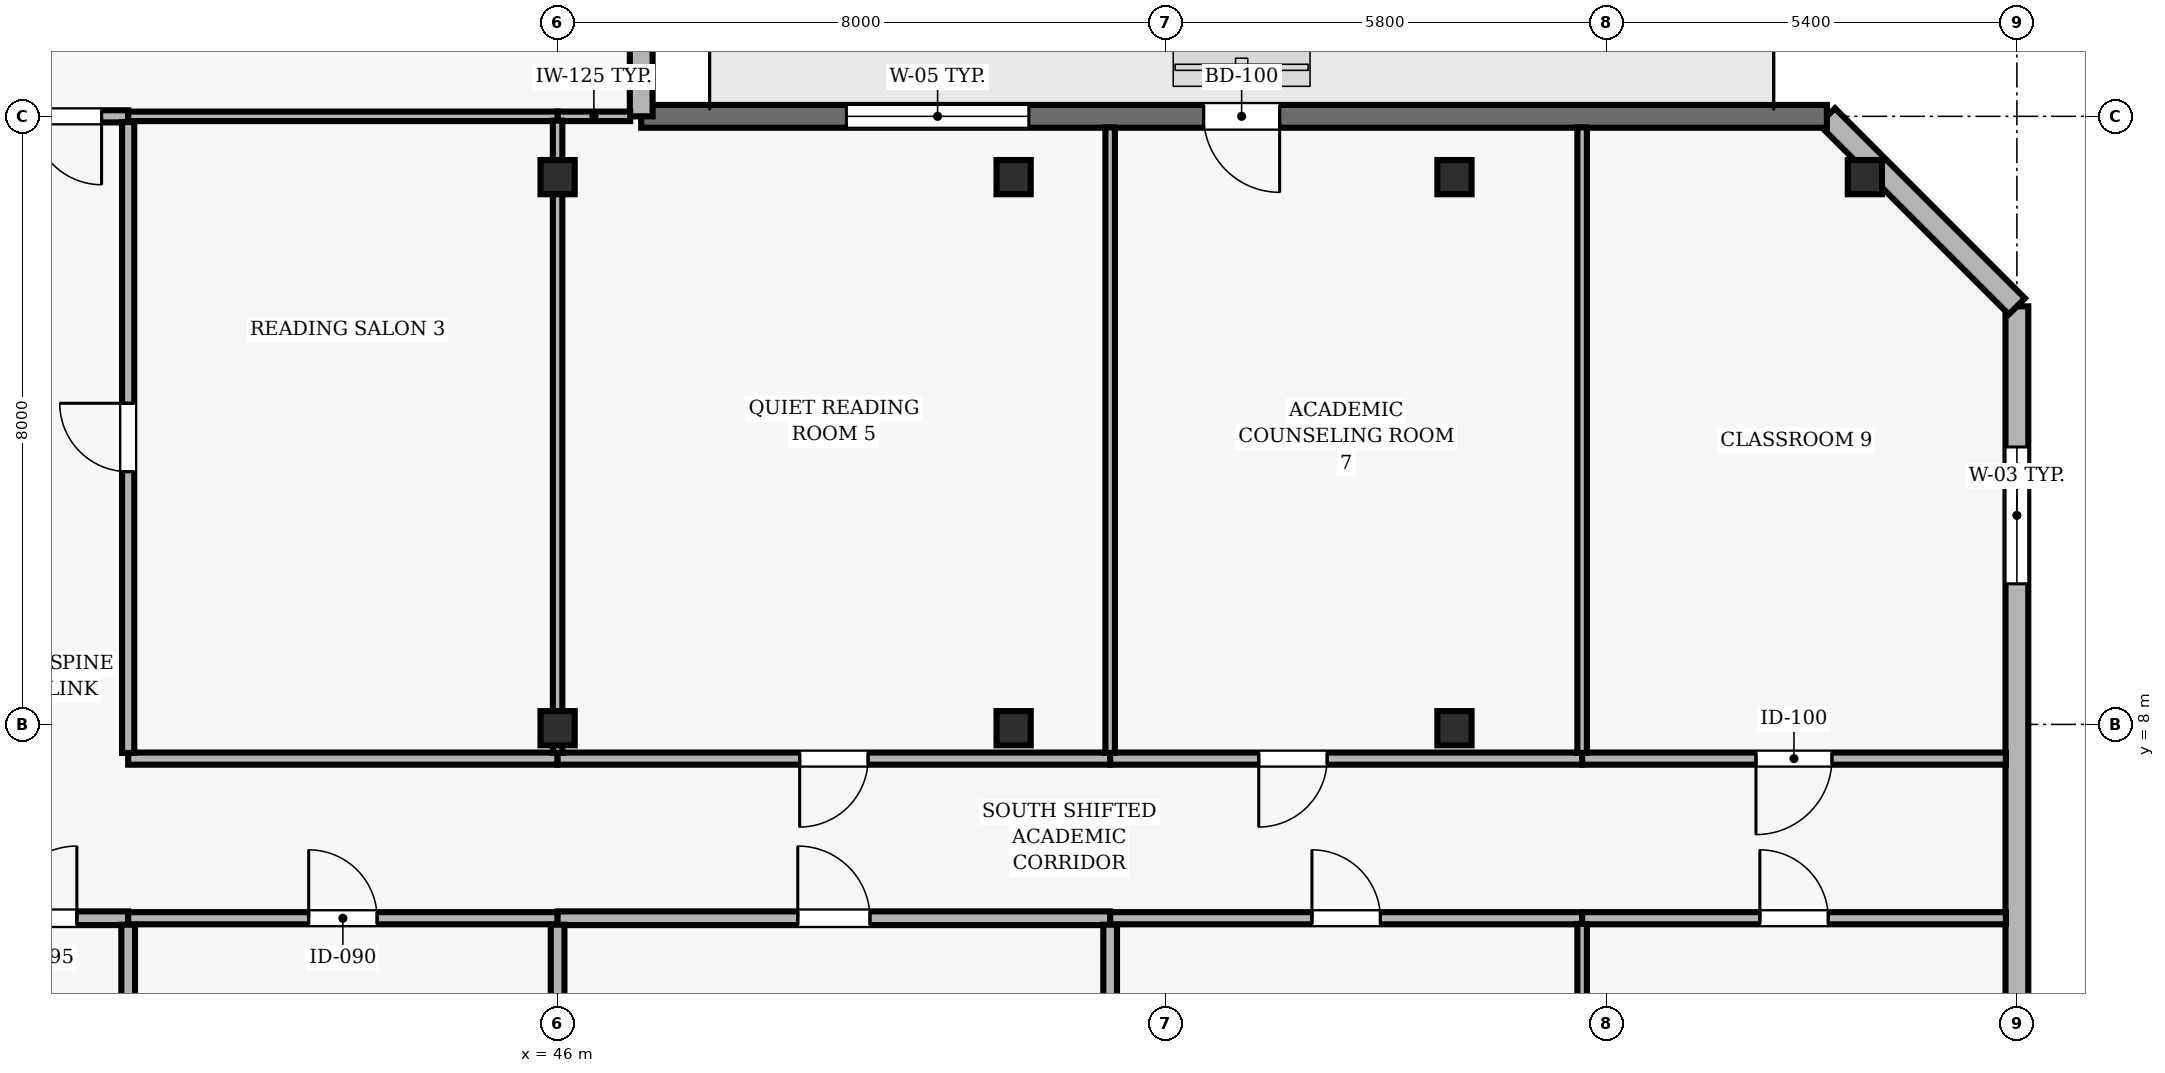
"""IFC4 building model, lengths in metres.
Left out: names, types, materials, properties, quantities, classifications, styles, units other than length and angle.
Written with IfcOpenShell. Run it as: python <this file> out.ifc"""

import sys

from ifc_helpers import new_model, si_unit, direction, frame, frame_2d, origin, origin_2d, place, context, subcontext, project, spatial, rectangle, hollow_rectangle, extrude, element, fill, save


model = new_model("IFC4")
c1 = context("Model", 3, precision=1e-05, world=origin(), true_north=direction((0.0, 1.0)))
c2 = subcontext(c1, "Body", "Model", "MODEL_VIEW")
j1 = project(units=[si_unit("LENGTHUNIT", "METRE"), si_unit("PLANEANGLEUNIT", "RADIAN")], contexts=[c1])
p1 = place(None, origin())
s1 = spatial("IfcSite", under=j1, at=p1, CompositionType="ELEMENT")
p2 = place(p1, origin())
s2 = spatial("IfcBuilding", under=s1, at=p2, CompositionType="ELEMENT")
p3 = place(p2, frame((0.0, 0.0, 199.2)))
s3 = spatial("IfcBuildingStorey", under=s2, at=p3, CompositionType="ELEMENT", Elevation=199.2)
for number, where, z_axis, x_axis in (
    (1, (46.0, 7.95, 0.0), (0.0, 0.0, 1.0), (1.0, 0.0, 0.0)),
    (2, (46.0, 15.2, 0.0), (0.0, 0.0, 1.0), (1.0, 0.0, 0.0)),
    (3, (52.0, 7.95, 0.0), (0.0, 0.0, 1.0), (1.0, 0.0, 0.0)),
    (4, (52.0, 15.2, 0.0), (0.0, 0.0, 1.0), (1.0, 0.0, 0.0)),
    (5, (57.8, 7.95, 0.0), (0.0, 0.0, 1.0), (1.0, 0.0, 0.0)),
    (6, (57.8, 15.2, 0.0), (0.0, 0.0, 1.0), (1.0, 0.0, 0.0)),
    (7, (63.2, 15.2, 0.0), (0.0, 0.0, 1.0), (1.0, 0.0, 0.0)),
):
    element("IfcColumn", number, at=place(p3, frame(where, z_axis=z_axis, x_axis=x_axis)), inside=s3, PredefinedType="COLUMN", context=c2, shape_type="SweptSolid", body=[
        extrude(hollow_rectangle(XDim=0.45, YDim=0.45, WallThickness=0.02, at=origin_2d()), origin(), (0.0, 0.0, 1.0), 3.9),
    ])
p4 = place(p3, frame((65.2, 2.5, 0.0), z_axis=(0.0, 0.0, 1.0), x_axis=(0.0, 1.0, 0.0)))
e8 = element("IfcWall", 8, at=p4, inside=s3, PredefinedType="SOLIDWALL", context=c2, shape_type="SweptSolid", body=[
    extrude(rectangle(XDim=11.0, YDim=0.3, at=frame_2d((5.5, 0.0))), origin(), (0.0, 0.0, 1.0), 3.69),
])
p5 = place(p4, frame((7.35, 0.0, 0.9)))
e9 = element("IfcOpeningElement", 9, at=p5, cuts=e8, PredefinedType="OPENING", context=c2, shape_type="SweptSolid", body=[
    extrude(rectangle(XDim=1.8, YDim=1.6, at=frame_2d((0.9, 0.8))), frame((0.0, 0.16, 0.0), z_axis=(0.0, -1.0, 0.0), x_axis=(1.0, 0.0, 0.0)), (0.0, 0.0, 1.0), 0.32),
])
p6 = place(p3, frame((65.2, 13.5, 0.0), z_axis=(0.0, 0.0, 1.0), x_axis=(-0.707106781187, 0.707106781187, 0.0)))
e10 = element("IfcWall", 10, at=p6, inside=s3, PredefinedType="SOLIDWALL", context=c2, shape_type="SweptSolid", body=[
    extrude(rectangle(XDim=3.536, YDim=0.3, at=frame_2d((1.768, 0.0))), origin(), (0.0, 0.0, 1.0), 3.69),
])
p7 = place(p3, frame((62.7, 16.0, 0.0), z_axis=(0.0, 0.0, 1.0), x_axis=(-1.0, 0.0, 0.0)))
e11 = element("IfcWall", 11, at=p7, inside=s3, PredefinedType="SOLIDWALL", context=c2, shape_type="SweptSolid", body=[
    extrude(rectangle(XDim=15.6, YDim=0.3, at=frame_2d((7.8, 0.0))), origin(), (0.0, 0.0, 1.0), 3.69),
])
p8 = place(p7, frame((7.2, 0.0, 0.0)))
e12 = element("IfcOpeningElement", 12, at=p8, cuts=e11, PredefinedType="OPENING", context=c2, shape_type="SweptSolid", body=[
    extrude(rectangle(XDim=1.0, YDim=2.2, at=frame_2d((0.5, 1.1))), frame((0.0, 0.16, 0.0), z_axis=(0.0, -1.0, 0.0), x_axis=(1.0, 0.0, 0.0)), (0.0, 0.0, 1.0), 0.32),
])
p9 = place(p7, frame((10.5, 0.0, 0.9)))
e13 = element("IfcOpeningElement", 13, at=p9, cuts=e11, PredefinedType="OPENING", context=c2, shape_type="SweptSolid", body=[
    extrude(rectangle(XDim=2.4, YDim=1.6, at=frame_2d((1.2, 0.8))), frame((0.0, 0.16, 0.0), z_axis=(0.0, -1.0, 0.0), x_axis=(1.0, 0.0, 0.0)), (0.0, 0.0, 1.0), 0.32),
])
p10 = place(p3, frame((47.1, 16.0, 0.0), z_axis=(0.0, 0.0, 1.0), x_axis=(0.0, 1.0, 0.0)))
e14 = element("IfcWall", 14, at=p10, inside=s3, PredefinedType="SOLIDWALL", context=c2, shape_type="SweptSolid", body=[
    extrude(rectangle(XDim=6.135, YDim=0.3, at=frame_2d((3.067, 0.0))), origin(), (0.0, 0.0, 1.0), 3.69),
])
p11 = place(p10, frame((2.318, 0.0, 0.9)))
e15 = element("IfcOpeningElement", 15, at=p11, cuts=e14, PredefinedType="OPENING", context=c2, shape_type="SweptSolid", body=[
    extrude(rectangle(XDim=1.5, YDim=1.8, at=frame_2d((0.75, 0.9))), frame((0.0, 0.16, 0.0), z_axis=(0.0, -1.0, 0.0), x_axis=(1.0, 0.0, 0.0)), (0.0, 0.0, 1.0), 0.32),
])
p12 = place(p3, frame((38.05, 5.45, 0.0), z_axis=(0.0, 0.0, 1.0), x_axis=(1.0, 0.0, 0.0)))
e16 = element("IfcWall", 16, at=p12, inside=s3, PredefinedType="PARTITIONING", context=c2, shape_type="SweptSolid", body=[
    extrude(rectangle(XDim=2.3, YDim=0.18, at=frame_2d((1.15, 0.0))), origin(), (0.0, 0.0, 1.0), 3.343),
])
p13 = place(p12, frame((0.675, 0.0, 0.0)))
e17 = element("IfcOpeningElement", 17, at=p13, cuts=e16, PredefinedType="OPENING", context=c2, shape_type="SweptSolid", body=[
    extrude(rectangle(XDim=0.95, YDim=2.1, at=frame_2d((0.475, 1.05))), frame((0.0, 0.1, 0.0), z_axis=(0.0, -1.0, 0.0), x_axis=(1.0, 0.0, 0.0)), (0.0, 0.0, 1.0), 0.2),
])
p14 = place(p3, frame((40.35, 5.45, 0.0), z_axis=(0.0, 0.0, 1.0), x_axis=(1.0, 0.0, 0.0)))
e18 = element("IfcWall", 18, at=p14, inside=s3, PredefinedType="PARTITIONING", context=c2, shape_type="SweptSolid", body=[
    extrude(rectangle(XDim=5.65, YDim=0.16, at=frame_2d((2.825, 0.0))), origin(), (0.0, 0.0, 1.0), 3.343),
])
p15 = place(p14, frame((2.375, 0.0, 0.0)))
e19 = element("IfcOpeningElement", 19, at=p15, cuts=e18, PredefinedType="OPENING", context=c2, shape_type="SweptSolid", body=[
    extrude(rectangle(XDim=0.9, YDim=2.1, at=frame_2d((0.45, 1.05))), frame((0.0, 0.09, 0.0), z_axis=(0.0, -1.0, 0.0), x_axis=(1.0, 0.0, 0.0)), (0.0, 0.0, 1.0), 0.18),
])
p16 = place(p3, frame((40.35, 16.0, 0.0), z_axis=(0.0, 0.0, 1.0), x_axis=(-1.0, 0.0, 0.0)))
e20 = element("IfcWall", 20, at=p16, inside=s3, PredefinedType="PARTITIONING", context=c2, shape_type="SweptSolid", body=[
    extrude(rectangle(XDim=2.3, YDim=0.16, at=frame_2d((1.15, 0.0))), origin(), (0.0, 0.0, 1.0), 3.69),
])
p17 = place(p16, frame((0.35, 0.0, 0.0)))
e21 = element("IfcOpeningElement", 21, at=p17, cuts=e20, PredefinedType="OPENING", context=c2, shape_type="SweptSolid", body=[
    extrude(rectangle(XDim=0.9, YDim=2.1, at=frame_2d((0.45, 1.05))), frame((0.0, 0.09, 0.0), z_axis=(0.0, -1.0, 0.0), x_axis=(1.0, 0.0, 0.0)), (0.0, 0.0, 1.0), 0.18),
])
p18 = place(p3, frame((46.0, 5.45, 0.0), z_axis=(0.0, 0.0, 1.0), x_axis=(1.0, 0.0, 0.0)))
e22 = element("IfcWall", 22, at=p18, inside=s3, PredefinedType="PARTITIONING", context=c2, shape_type="SweptSolid", body=[
    extrude(rectangle(XDim=7.27, YDim=0.18, at=frame_2d((3.635, 0.0))), origin(), (0.0, 0.0, 1.0), 3.343),
])
p19 = place(p18, frame((3.16, 0.0, 0.0)))
e23 = element("IfcOpeningElement", 23, at=p19, cuts=e22, PredefinedType="OPENING", context=c2, shape_type="SweptSolid", body=[
    extrude(rectangle(XDim=0.95, YDim=2.1, at=frame_2d((0.475, 1.05))), frame((0.0, 0.1, 0.0), z_axis=(0.0, -1.0, 0.0), x_axis=(1.0, 0.0, 0.0)), (0.0, 0.0, 1.0), 0.2),
])
p20 = place(p3, frame((46.0, 7.55, 0.0), z_axis=(0.0, 0.0, 1.0), x_axis=(-1.0, 0.0, 0.0)))
e24 = element("IfcWall", 24, at=p20, inside=s3, PredefinedType="PARTITIONING", context=c2, shape_type="SweptSolid", body=[
    extrude(rectangle(XDim=5.65, YDim=0.16, at=frame_2d((2.825, 0.0))), origin(), (0.0, 0.0, 1.0), 3.139),
])
p21 = place(p3, frame((46.0, 16.0, 0.0), z_axis=(0.0, 0.0, 1.0), x_axis=(1.0, 0.0, 0.0)))
e25 = element("IfcWall", 25, at=p21, inside=s3, PredefinedType="PARTITIONING", context=c2, shape_type="SweptSolid", body=[
    extrude(rectangle(XDim=0.955, YDim=0.125, at=frame_2d((0.478, 0.0))), origin(), (0.0, 0.0, 1.0), 3.39),
])
p22 = place(p3, frame((46.0, 16.0, 0.0), z_axis=(0.0, 0.0, 1.0), x_axis=(-1.0, 0.0, 0.0)))
e26 = element("IfcWall", 26, at=p22, inside=s3, PredefinedType="PARTITIONING", context=c2, shape_type="SweptSolid", body=[
    extrude(rectangle(XDim=5.65, YDim=0.125, at=frame_2d((2.825, 0.0))), origin(), (0.0, 0.0, 1.0), 3.69),
])
p23 = place(p3, frame((53.27, 5.45, 0.0), z_axis=(0.0, 0.0, 1.0), x_axis=(1.0, 0.0, 0.0)))
e27 = element("IfcWall", 27, at=p23, inside=s3, PredefinedType="PARTITIONING", context=c2, shape_type="SweptSolid", body=[
    extrude(rectangle(XDim=6.21, YDim=0.16, at=frame_2d((3.105, 0.0))), origin(), (0.0, 0.0, 1.0), 3.343),
])
p24 = place(p23, frame((2.655, 0.0, 0.0)))
e28 = element("IfcOpeningElement", 28, at=p24, cuts=e27, PredefinedType="OPENING", context=c2, shape_type="SweptSolid", body=[
    extrude(rectangle(XDim=0.9, YDim=2.1, at=frame_2d((0.45, 1.05))), frame((0.0, 0.09, 0.0), z_axis=(0.0, -1.0, 0.0), x_axis=(1.0, 0.0, 0.0)), (0.0, 0.0, 1.0), 0.18),
])
p25 = place(p3, frame((53.27, 7.55, 0.0), z_axis=(0.0, 0.0, 1.0), x_axis=(-1.0, 0.0, 0.0)))
e29 = element("IfcWall", 29, at=p25, inside=s3, PredefinedType="PARTITIONING", context=c2, shape_type="SweptSolid", body=[
    extrude(rectangle(XDim=7.27, YDim=0.16, at=frame_2d((3.635, 0.0))), origin(), (0.0, 0.0, 1.0), 3.139),
])
p26 = place(p25, frame((3.185, 0.0, 0.0)))
e30 = element("IfcOpeningElement", 30, at=p26, cuts=e29, PredefinedType="OPENING", context=c2, shape_type="SweptSolid", body=[
    extrude(rectangle(XDim=0.9, YDim=2.1, at=frame_2d((0.45, 1.05))), frame((0.0, 0.09, 0.0), z_axis=(0.0, -1.0, 0.0), x_axis=(1.0, 0.0, 0.0)), (0.0, 0.0, 1.0), 0.18),
])
p27 = place(p3, frame((59.48, 5.45, 0.0), z_axis=(0.0, 0.0, 1.0), x_axis=(1.0, 0.0, 0.0)))
e31 = element("IfcWall", 31, at=p27, inside=s3, PredefinedType="PARTITIONING", context=c2, shape_type="SweptSolid", body=[
    extrude(rectangle(XDim=5.575, YDim=0.16, at=frame_2d((2.788, 0.0))), origin(), (0.0, 0.0, 1.0), 3.69),
])
p28 = place(p27, frame((2.338, 0.0, 0.0)))
e32 = element("IfcOpeningElement", 32, at=p28, cuts=e31, PredefinedType="OPENING", context=c2, shape_type="SweptSolid", body=[
    extrude(rectangle(XDim=0.9, YDim=2.1, at=frame_2d((0.45, 1.05))), frame((0.0, 0.09, 0.0), z_axis=(0.0, -1.0, 0.0), x_axis=(1.0, 0.0, 0.0)), (0.0, 0.0, 1.0), 0.18),
])
p29 = place(p3, frame((59.48, 7.55, 0.0), z_axis=(0.0, 0.0, 1.0), x_axis=(-1.0, 0.0, 0.0)))
e33 = element("IfcWall", 33, at=p29, inside=s3, PredefinedType="PARTITIONING", context=c2, shape_type="SweptSolid", body=[
    extrude(rectangle(XDim=6.21, YDim=0.16, at=frame_2d((3.105, 0.0))), origin(), (0.0, 0.0, 1.0), 3.139),
])
p30 = place(p29, frame((3.355, 0.0, 0.0)))
e34 = element("IfcOpeningElement", 34, at=p30, cuts=e33, PredefinedType="OPENING", context=c2, shape_type="SweptSolid", body=[
    extrude(rectangle(XDim=0.9, YDim=2.1, at=frame_2d((0.45, 1.05))), frame((0.0, 0.09, 0.0), z_axis=(0.0, -1.0, 0.0), x_axis=(1.0, 0.0, 0.0)), (0.0, 0.0, 1.0), 0.18),
])
p31 = place(p3, frame((65.055, 7.55, 0.0), z_axis=(0.0, 0.0, 1.0), x_axis=(-1.0, 0.0, 0.0)))
e35 = element("IfcWall", 35, at=p31, inside=s3, PredefinedType="PARTITIONING", context=c2, shape_type="SweptSolid", body=[
    extrude(rectangle(XDim=5.575, YDim=0.16, at=frame_2d((2.788, 0.0))), origin(), (0.0, 0.0, 1.0), 3.69),
])
p32 = place(p31, frame((2.288, 0.0, 0.0)))
e36 = element("IfcOpeningElement", 36, at=p32, cuts=e35, PredefinedType="OPENING", context=c2, shape_type="SweptSolid", body=[
    extrude(rectangle(XDim=1.0, YDim=2.1, at=frame_2d((0.5, 1.05))), frame((0.0, 0.09, 0.0), z_axis=(0.0, -1.0, 0.0), x_axis=(1.0, 0.0, 0.0)), (0.0, 0.0, 1.0), 0.18),
])
p33 = place(p3, frame((40.35, 0.145, 0.0), z_axis=(0.0, 0.0, 1.0), x_axis=(0.0, 1.0, 0.0)))
e37 = element("IfcWall", 37, at=p33, inside=s3, PredefinedType="PARTITIONING", context=c2, shape_type="SweptSolid", body=[
    extrude(rectangle(XDim=5.22, YDim=0.18, at=frame_2d((2.61, 0.0))), origin(), (0.0, 0.0, 1.0), 3.69),
])
p34 = place(p3, frame((40.35, 7.625, 0.0), z_axis=(0.0, 0.0, 1.0), x_axis=(0.0, 1.0, 0.0)))
e38 = element("IfcWall", 38, at=p34, inside=s3, PredefinedType="PARTITIONING", context=c2, shape_type="SweptSolid", body=[
    extrude(rectangle(XDim=8.3, YDim=0.16, at=frame_2d((4.15, 0.0))), origin(), (0.0, 0.0, 1.0), 3.343),
])
p35 = place(p34, frame((3.7, 0.0, 0.0)))
e39 = element("IfcOpeningElement", 39, at=p35, cuts=e38, PredefinedType="OPENING", context=c2, shape_type="SweptSolid", body=[
    extrude(rectangle(XDim=0.9, YDim=2.1, at=frame_2d((0.45, 1.05))), frame((0.0, 0.09, 0.0), z_axis=(0.0, -1.0, 0.0), x_axis=(1.0, 0.0, 0.0)), (0.0, 0.0, 1.0), 0.18),
])
p36 = place(p3, frame((46.0, 0.145, 0.0), z_axis=(0.0, 0.0, 1.0), x_axis=(0.0, 1.0, 0.0)))
e40 = element("IfcWall", 40, at=p36, inside=s3, PredefinedType="PARTITIONING", context=c2, shape_type="SweptSolid", body=[
    extrude(rectangle(XDim=5.22, YDim=0.18, at=frame_2d((2.61, 0.0))), origin(), (0.0, 0.0, 1.0), 3.139),
])
p37 = place(p3, frame((46.0, 7.625, 0.0), z_axis=(0.0, 0.0, 1.0), x_axis=(0.0, 1.0, 0.0)))
e41 = element("IfcWall", 41, at=p37, inside=s3, PredefinedType="PARTITIONING", context=c2, shape_type="SweptSolid", body=[
    extrude(rectangle(XDim=8.318, YDim=0.125, at=frame_2d((4.159, 0.0))), origin(), (0.0, 0.0, 1.0), 3.139),
])
p38 = place(p3, frame((53.27, 0.145, 0.0), z_axis=(0.0, 0.0, 1.0), x_axis=(0.0, 1.0, 0.0)))
e42 = element("IfcWall", 42, at=p38, inside=s3, PredefinedType="PARTITIONING", context=c2, shape_type="SweptSolid", body=[
    extrude(rectangle(XDim=5.22, YDim=0.18, at=frame_2d((2.61, 0.0))), origin(), (0.0, 0.0, 1.0), 3.69),
])
p39 = place(p3, frame((53.27, 7.625, 0.0), z_axis=(0.0, 0.0, 1.0), x_axis=(0.0, 1.0, 0.0)))
e43 = element("IfcWall", 43, at=p39, inside=s3, PredefinedType="PARTITIONING", context=c2, shape_type="SweptSolid", body=[
    extrude(rectangle(XDim=8.23, YDim=0.125, at=frame_2d((4.115, 0.0))), origin(), (0.0, 0.0, 1.0), 3.69),
])
p40 = place(p3, frame((59.48, 0.145, 0.0), z_axis=(0.0, 0.0, 1.0), x_axis=(0.0, 1.0, 0.0)))
e44 = element("IfcWall", 44, at=p40, inside=s3, PredefinedType="PARTITIONING", context=c2, shape_type="SweptSolid", body=[
    extrude(rectangle(XDim=5.23, YDim=0.125, at=frame_2d((2.615, 0.0))), origin(), (0.0, 0.0, 1.0), 3.69),
])
p41 = place(p3, frame((59.48, 7.625, 0.0), z_axis=(0.0, 0.0, 1.0), x_axis=(0.0, 1.0, 0.0)))
e45 = element("IfcWall", 45, at=p41, inside=s3, PredefinedType="PARTITIONING", context=c2, shape_type="SweptSolid", body=[
    extrude(rectangle(XDim=8.23, YDim=0.125, at=frame_2d((4.115, 0.0))), origin(), (0.0, 0.0, 1.0), 3.69),
])
p42 = place(p5, origin())
e46 = element("IfcWindow", 46, at=p42, inside=s3, PartitioningType="SINGLE_PANEL", PredefinedType="WINDOW", context=c2, shape_type="SweptSolid", body=[
    extrude(rectangle(XDim=1.8, YDim=1.6, at=frame_2d((0.9, 0.8))), frame((0.0, 0.03, 0.0), z_axis=(0.0, -1.0, 0.0), x_axis=(1.0, 0.0, 0.0)), (0.0, 0.0, 1.0), 0.06),
])
fill(e9, e46)
p43 = place(p8, origin())
e47 = element("IfcDoor", 47, at=p43, inside=s3, OperationType="SINGLE_SWING_LEFT", PredefinedType="DOOR", context=c2, shape_type="SweptSolid", body=[
    extrude(rectangle(XDim=1.0, YDim=2.2, at=frame_2d((0.5, 1.1))), frame((0.0, 0.025, 0.0), z_axis=(0.0, -1.0, 0.0), x_axis=(1.0, 0.0, 0.0)), (0.0, 0.0, 1.0), 0.05),
])
fill(e12, e47)
p44 = place(p9, origin())
e48 = element("IfcWindow", 48, at=p44, inside=s3, PartitioningType="SINGLE_PANEL", PredefinedType="WINDOW", context=c2, shape_type="SweptSolid", body=[
    extrude(rectangle(XDim=2.4, YDim=1.6, at=frame_2d((1.2, 0.8))), frame((0.0, 0.03, 0.0), z_axis=(0.0, -1.0, 0.0), x_axis=(1.0, 0.0, 0.0)), (0.0, 0.0, 1.0), 0.06),
])
fill(e13, e48)
p45 = place(p13, origin())
e49 = element("IfcDoor", 49, at=p45, inside=s3, OperationType="SINGLE_SWING_RIGHT", PredefinedType="DOOR", context=c2, shape_type="SweptSolid", body=[
    extrude(rectangle(XDim=0.95, YDim=2.1, at=frame_2d((0.475, 1.05))), frame((0.0, 0.025, 0.0), z_axis=(0.0, -1.0, 0.0), x_axis=(1.0, 0.0, 0.0)), (0.0, 0.0, 1.0), 0.05),
])
fill(e17, e49)
p46 = place(p15, origin())
e50 = element("IfcDoor", 50, at=p46, inside=s3, OperationType="SINGLE_SWING_LEFT", PredefinedType="DOOR", context=c2, shape_type="SweptSolid", body=[
    extrude(rectangle(XDim=0.9, YDim=2.1, at=frame_2d((0.45, 1.05))), frame((0.0, 0.025, 0.0), z_axis=(0.0, -1.0, 0.0), x_axis=(1.0, 0.0, 0.0)), (0.0, 0.0, 1.0), 0.05),
])
fill(e19, e50)
p47 = place(p35, origin())
e51 = element("IfcDoor", 51, at=p47, inside=s3, OperationType="SINGLE_SWING_RIGHT", PredefinedType="DOOR", context=c2, shape_type="SweptSolid", body=[
    extrude(rectangle(XDim=0.9, YDim=2.1, at=frame_2d((0.45, 1.05))), frame((0.0, 0.025, 0.0), z_axis=(0.0, -1.0, 0.0), x_axis=(1.0, 0.0, 0.0)), (0.0, 0.0, 1.0), 0.05),
])
fill(e39, e51)
p48 = place(p19, origin())
e52 = element("IfcDoor", 52, at=p48, inside=s3, OperationType="SINGLE_SWING_LEFT", PredefinedType="DOOR", context=c2, shape_type="SweptSolid", body=[
    extrude(rectangle(XDim=0.95, YDim=2.1, at=frame_2d((0.475, 1.05))), frame((0.0, 0.025, 0.0), z_axis=(0.0, -1.0, 0.0), x_axis=(1.0, 0.0, 0.0)), (0.0, 0.0, 1.0), 0.05),
])
fill(e23, e52)
p49 = place(p26, origin())
e53 = element("IfcDoor", 53, at=p49, inside=s3, OperationType="SINGLE_SWING_RIGHT", PredefinedType="DOOR", context=c2, shape_type="SweptSolid", body=[
    extrude(rectangle(XDim=0.9, YDim=2.1, at=frame_2d((0.45, 1.05))), frame((0.0, 0.025, 0.0), z_axis=(0.0, -1.0, 0.0), x_axis=(1.0, 0.0, 0.0)), (0.0, 0.0, 1.0), 0.05),
])
fill(e30, e53)
p50 = place(p24, origin())
e54 = element("IfcDoor", 54, at=p50, inside=s3, OperationType="SINGLE_SWING_LEFT", PredefinedType="DOOR", context=c2, shape_type="SweptSolid", body=[
    extrude(rectangle(XDim=0.9, YDim=2.1, at=frame_2d((0.45, 1.05))), frame((0.0, 0.025, 0.0), z_axis=(0.0, -1.0, 0.0), x_axis=(1.0, 0.0, 0.0)), (0.0, 0.0, 1.0), 0.05),
])
fill(e28, e54)
p51 = place(p30, origin())
e55 = element("IfcDoor", 55, at=p51, inside=s3, OperationType="SINGLE_SWING_RIGHT", PredefinedType="DOOR", context=c2, shape_type="SweptSolid", body=[
    extrude(rectangle(XDim=0.9, YDim=2.1, at=frame_2d((0.45, 1.05))), frame((0.0, 0.025, 0.0), z_axis=(0.0, -1.0, 0.0), x_axis=(1.0, 0.0, 0.0)), (0.0, 0.0, 1.0), 0.05),
])
fill(e34, e55)
p52 = place(p28, origin())
e56 = element("IfcDoor", 56, at=p52, inside=s3, OperationType="SINGLE_SWING_LEFT", PredefinedType="DOOR", context=c2, shape_type="SweptSolid", body=[
    extrude(rectangle(XDim=0.9, YDim=2.1, at=frame_2d((0.45, 1.05))), frame((0.0, 0.025, 0.0), z_axis=(0.0, -1.0, 0.0), x_axis=(1.0, 0.0, 0.0)), (0.0, 0.0, 1.0), 0.05),
])
fill(e32, e56)
p53 = place(p32, origin())
e57 = element("IfcDoor", 57, at=p53, inside=s3, OperationType="SINGLE_SWING_RIGHT", PredefinedType="DOOR", context=c2, shape_type="SweptSolid", body=[
    extrude(rectangle(XDim=1.0, YDim=2.1, at=frame_2d((0.5, 1.05))), frame((0.0, 0.025, 0.0), z_axis=(0.0, -1.0, 0.0), x_axis=(1.0, 0.0, 0.0)), (0.0, 0.0, 1.0), 0.05),
])
fill(e36, e57)
p54 = place(p17, origin())
e58 = element("IfcDoor", 58, at=p54, inside=s3, OperationType="SINGLE_SWING_LEFT", PredefinedType="DOOR", context=c2, shape_type="SweptSolid", body=[
    extrude(rectangle(XDim=0.9, YDim=2.1, at=frame_2d((0.45, 1.05))), frame((0.0, 0.025, 0.0), z_axis=(0.0, -1.0, 0.0), x_axis=(1.0, 0.0, 0.0)), (0.0, 0.0, 1.0), 0.05),
])
fill(e21, e58)
save(model, sys.argv[1])
